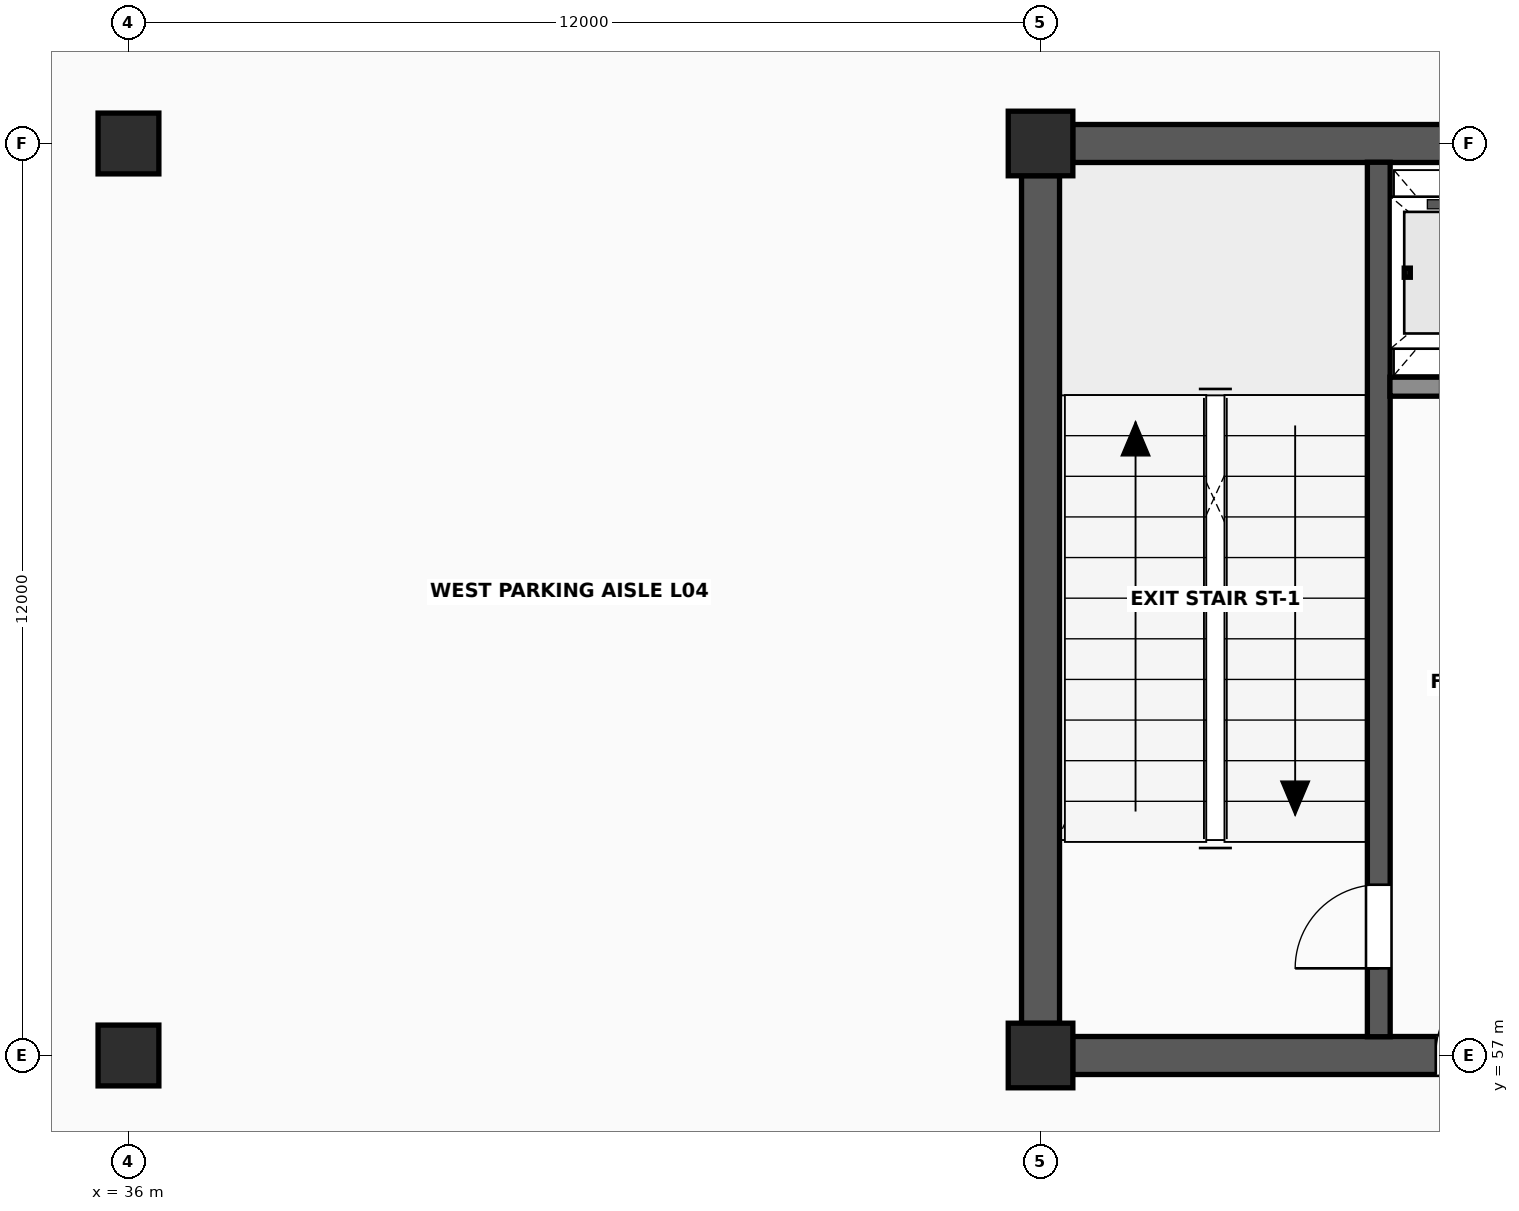
"""IFC4 building model, lengths in metres.
Left out: names, types, materials, properties, quantities, classifications, styles, units other than length and angle.
Written with IfcOpenShell. Run it as: python <this file> out.ifc"""

import sys

from ifc_helpers import new_model, si_unit, direction, frame, frame_2d, origin, origin_2d, place, context, subcontext, project, spatial, rectangle, extrude, element, fill, save


model = new_model("IFC4")
c1 = context("Model", 3, precision=1e-05, world=origin(), true_north=direction((0.0, 1.0)))
c2 = subcontext(c1, "Body", "Model", "MODEL_VIEW")
j1 = project(units=[si_unit("LENGTHUNIT", "METRE"), si_unit("PLANEANGLEUNIT", "RADIAN")], contexts=[c1])
p1 = place(None, origin())
s1 = spatial("IfcSite", under=j1, at=p1, CompositionType="ELEMENT")
p2 = place(p1, origin())
s2 = spatial("IfcBuilding", under=s1, at=p2, CompositionType="ELEMENT")
p3 = place(p2, frame((0.0, 0.0, 17.2)))
s3 = spatial("IfcBuildingStorey", under=s2, at=p3, CompositionType="ELEMENT", Elevation=17.2)
for number, where, z_axis, x_axis in (
    (1, (36.0, 57.0, 0.0), (0.0, 0.0, 1.0), (1.0, 0.0, 0.0)),
    (2, (36.0, 69.0, 0.0), (0.0, 0.0, 1.0), (1.0, 0.0, 0.0)),
):
    element("IfcColumn", number, at=place(p3, frame(where, z_axis=z_axis, x_axis=x_axis)), inside=s3, PredefinedType="COLUMN", context=c2, shape_type="SweptSolid", body=[
        extrude(rectangle(XDim=0.8, YDim=0.8, at=origin_2d()), origin(), (0.0, 0.0, 1.0), 3.8),
    ])
for number, where, z_axis, x_axis in (
    (3, (48.0, 57.0, 0.0), (0.0, 0.0, 1.0), (1.0, 0.0, 0.0)),
    (4, (48.0, 69.0, 0.0), (0.0, 0.0, 1.0), (1.0, 0.0, 0.0)),
):
    element("IfcColumn", number, at=place(p3, frame(where, z_axis=z_axis, x_axis=x_axis)), inside=s3, PredefinedType="COLUMN", context=c2, shape_type="SweptSolid", body=[
        extrude(rectangle(XDim=0.85, YDim=0.85, at=origin_2d()), origin(), (0.0, 0.0, 1.0), 3.8),
    ])
p4 = place(p3, frame((48.422, 57.0, 0.0), z_axis=(0.0, 0.0, 1.0), x_axis=(1.0, 0.0, 0.0)))
e5 = element("IfcWall", 5, at=p4, inside=s3, PredefinedType="SHEAR", context=c2, shape_type="SweptSolid", body=[
    extrude(rectangle(XDim=11.156, YDim=0.5, at=frame_2d((5.578, 0.0))), origin(), (0.0, 0.0, 1.0), 3.643),
])
p5 = place(p4, frame((4.778, 0.0, 0.0)))
e6 = element("IfcOpeningElement", 6, at=p5, cuts=e5, PredefinedType="OPENING", context=c2, shape_type="SweptSolid", body=[
    extrude(rectangle(XDim=1.2, YDim=2.2, at=frame_2d((0.6, 1.1))), frame((0.0, 0.265, 0.0), z_axis=(0.0, -1.0, 0.0), x_axis=(1.0, 0.0, 0.0)), (0.0, 0.0, 1.0), 0.53),
])
p6 = place(p4, frame((8.478, 0.0, 0.0)))
e7 = element("IfcOpeningElement", 7, at=p6, cuts=e5, PredefinedType="OPENING", context=c2, shape_type="SweptSolid", body=[
    extrude(rectangle(XDim=1.5, YDim=2.25, at=frame_2d((0.75, 1.125))), frame((0.0, 0.265, 0.0), z_axis=(0.0, -1.0, 0.0), x_axis=(1.0, 0.0, 0.0)), (0.0, 0.0, 1.0), 0.53),
])
for number, where, z_axis, x_axis in (
    (8, (48.422, 69.0, 0.0), (0.0, 0.0, 1.0), (1.0, 0.0, 0.0)),
    (9, (48.0, 57.422, 0.0), (0.0, 0.0, 1.0), (0.0, 1.0, 0.0)),
):
    element("IfcWall", number, at=place(p3, frame(where, z_axis=z_axis, x_axis=x_axis)), inside=s3, PredefinedType="SHEAR", context=c2, shape_type="SweptSolid", body=[
        extrude(rectangle(XDim=11.156, YDim=0.5, at=frame_2d((5.578, 0.0))), origin(), (0.0, 0.0, 1.0), 3.643),
    ])
p7 = place(p3, frame((52.45, 57.247, 0.0), z_axis=(0.0, 0.0, 1.0), x_axis=(0.0, 1.0, 0.0)))
e10 = element("IfcWall", 10, at=p7, inside=s3, PredefinedType="SHEAR", context=c2, shape_type="SweptSolid", body=[
    extrude(rectangle(XDim=11.506, YDim=0.3, at=frame_2d((5.753, 0.0))), origin(), (0.0, 0.0, 1.0), 3.643),
])
p8 = place(p7, frame((0.9, 0.0, 0.0)))
e11 = element("IfcOpeningElement", 11, at=p8, cuts=e10, PredefinedType="OPENING", context=c2, shape_type="SweptSolid", body=[
    extrude(rectangle(XDim=1.1, YDim=2.2, at=frame_2d((0.55, 1.1))), frame((0.0, 0.165, 0.0), z_axis=(0.0, -1.0, 0.0), x_axis=(1.0, 0.0, 0.0)), (0.0, 0.0, 1.0), 0.33),
])
p9 = place(p3, frame((52.597, 65.8, 0.0), z_axis=(0.0, 0.0, 1.0), x_axis=(1.0, 0.0, 0.0)))
e12 = element("IfcWall", 12, at=p9, inside=s3, PredefinedType="SOLIDWALL", context=c2, shape_type="SweptSolid", body=[
    extrude(rectangle(XDim=7.156, YDim=0.25, at=frame_2d((3.578, 0.0))), origin(), (0.0, 0.0, 1.0), 3.643),
])
p10 = place(p9, frame((0.653, 0.0, 0.0)))
e13 = element("IfcOpeningElement", 13, at=p10, cuts=e12, PredefinedType="OPENING", context=c2, shape_type="SweptSolid", body=[
    extrude(rectangle(XDim=1.1, YDim=2.24, at=frame_2d((0.55, 1.12))), frame((0.0, 0.14, 0.0), z_axis=(0.0, -1.0, 0.0), x_axis=(1.0, 0.0, 0.0)), (0.0, 0.0, 1.0), 0.28),
])
p11 = place(p9, frame((3.153, 0.0, 0.0)))
e14 = element("IfcOpeningElement", 14, at=p11, cuts=e12, PredefinedType="OPENING", context=c2, shape_type="SweptSolid", body=[
    extrude(rectangle(XDim=1.05, YDim=2.2, at=frame_2d((0.525, 1.1))), frame((0.0, 0.14, 0.0), z_axis=(0.0, -1.0, 0.0), x_axis=(1.0, 0.0, 0.0)), (0.0, 0.0, 1.0), 0.28),
])
p12 = place(p9, frame((5.528, 0.0, 0.0)))
e15 = element("IfcOpeningElement", 15, at=p12, cuts=e12, PredefinedType="OPENING", context=c2, shape_type="SweptSolid", body=[
    extrude(rectangle(XDim=1.05, YDim=2.2, at=frame_2d((0.525, 1.1))), frame((0.0, 0.14, 0.0), z_axis=(0.0, -1.0, 0.0), x_axis=(1.0, 0.0, 0.0)), (0.0, 0.0, 1.0), 0.28),
])
p13 = place(p8, origin())
e16 = element("IfcDoor", 16, at=p13, inside=s3, OperationType="SINGLE_SWING_LEFT", PredefinedType="DOOR", context=c2, shape_type="SweptSolid", body=[
    extrude(rectangle(XDim=1.1, YDim=2.2, at=frame_2d((0.55, 1.1))), frame((0.0, 0.025, 0.0), z_axis=(0.0, -1.0, 0.0), x_axis=(1.0, 0.0, 0.0)), (0.0, 0.0, 1.0), 0.05),
])
fill(e11, e16)
p14 = place(p5, origin())
e17 = element("IfcDoor", 17, at=p14, inside=s3, OperationType="SINGLE_SWING_RIGHT", PredefinedType="DOOR", context=c2, shape_type="SweptSolid", body=[
    extrude(rectangle(XDim=1.2, YDim=2.2, at=frame_2d((0.6, 1.1))), frame((0.0, 0.025, 0.0), z_axis=(0.0, -1.0, 0.0), x_axis=(1.0, 0.0, 0.0)), (0.0, 0.0, 1.0), 0.05),
])
fill(e6, e17)
save(model, sys.argv[1])
